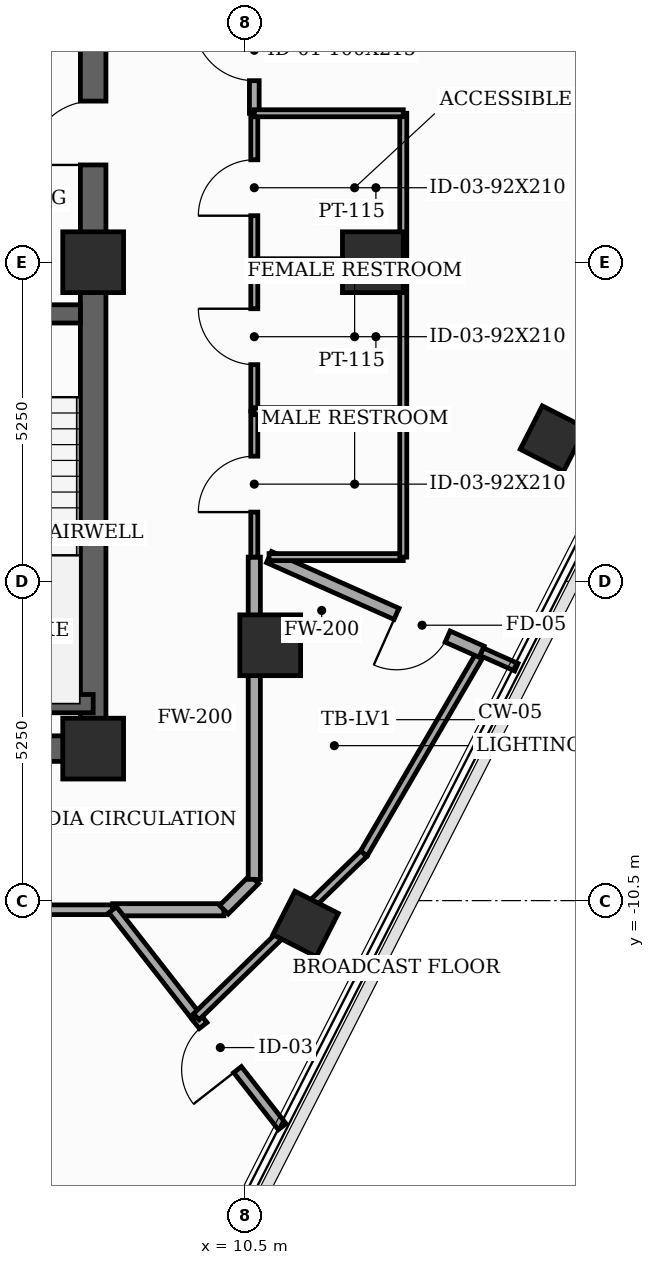
"""IFC4 building model, lengths in metres.
Left out: names, types, materials, properties, quantities, classifications, styles, units other than length and angle.
Written with IfcOpenShell. Run it as: python <this file> out.ifc"""

import sys

from ifc_helpers import new_model, si_unit, direction, frame, frame_2d, origin, origin_2d, place, context, subcontext, project, spatial, rectangle, extrude, element, fill, save


model = new_model("IFC4")
c1 = context("Model", 3, precision=1e-05, world=origin(), true_north=direction((0.0, 1.0)))
c2 = subcontext(c1, "Body", "Model", "MODEL_VIEW")
j1 = project(units=[si_unit("LENGTHUNIT", "METRE"), si_unit("PLANEANGLEUNIT", "RADIAN")], contexts=[c1])
p1 = place(None, origin())
s1 = spatial("IfcSite", under=j1, at=p1, CompositionType="ELEMENT")
p2 = place(p1, origin())
s2 = spatial("IfcBuilding", under=s1, at=p2, CompositionType="ELEMENT")
p3 = place(p2, frame((0.0, 0.0, 274.4)))
s3 = spatial("IfcBuildingStorey", under=s2, at=p3, CompositionType="ELEMENT", Elevation=274.4)
for number, where, z_axis, x_axis in (
    (1, (8.0, -8.0, 0.0), (0.0, 0.0, 1.0), (1.0, 0.0, 0.0)),
    (2, (8.0, 0.0, 0.0), (0.0, 0.0, 1.0), (1.0, 0.0, 0.0)),
    (3, (12.6, 0.0, 0.0), (0.0, 0.0, 1.0), (1.0, 0.0, 0.0)),
    (4, (10.912, -6.3, 0.0), (0.0, 0.0, 1.0), (1.0, 0.0, 0.0)),
):
    element("IfcColumn", number, at=place(p3, frame(where, z_axis=z_axis, x_axis=x_axis)), inside=s3, PredefinedType="COLUMN", context=c2, shape_type="SweptSolid", body=[
        extrude(rectangle(XDim=1.0, YDim=1.0, at=origin_2d()), origin(), (0.0, 0.0, 1.0), 3.7),
    ])
for number, where, z_axis, x_axis in (
    (5, (11.494, -10.885, 0.0), (0.0, 0.0, 1.0), (0.454, 0.891, 0.0)),
    (6, (15.562, -2.901, 0.0), (0.0, 0.0, 1.0), (0.454, 0.891, 0.0)),
):
    element("IfcColumn", number, at=place(p3, frame(where, z_axis=z_axis, x_axis=x_axis)), inside=s3, PredefinedType="COLUMN", context=c2, shape_type="SweptSolid", body=[
        extrude(rectangle(XDim=0.8, YDim=0.8, at=origin_2d()), origin(), (0.0, 0.0, 1.0), 3.7),
    ])
p4 = place(p3, frame((8.0, -8.0, 0.0), z_axis=(0.0, 0.0, 1.0), x_axis=(0.0, 1.0, 0.0)))
e7 = element("IfcWall", 7, at=p4, inside=s3, PredefinedType="SHEAR", context=c2, shape_type="SweptSolid", body=[
    extrude(rectangle(XDim=16.0, YDim=0.42, at=frame_2d((8.0, 0.0))), origin(), (0.0, 0.0, 1.0), 3.46),
])
p5 = place(p4, frame((9.6, 0.0, 0.0)))
e8 = element("IfcOpeningElement", 8, at=p5, cuts=e7, PredefinedType="OPENING", context=c2, shape_type="SweptSolid", body=[
    extrude(rectangle(XDim=1.05, YDim=2.15, at=frame_2d((0.525, 1.075))), frame((0.0, 0.22, 0.0), z_axis=(0.0, -1.0, 0.0), x_axis=(1.0, 0.0, 0.0)), (0.0, 0.0, 1.0), 0.44),
])
p6 = place(p4, frame((14.469, 0.0, 0.0)))
e9 = element("IfcOpeningElement", 9, at=p6, cuts=e7, PredefinedType="OPENING", context=c2, shape_type="SweptSolid", body=[
    extrude(rectangle(XDim=0.85, YDim=2.02, at=frame_2d((0.425, 1.01))), frame((0.0, 0.22, 0.0), z_axis=(0.0, -1.0, 0.0), x_axis=(1.0, 0.0, 0.0)), (0.0, 0.0, 1.0), 0.44),
])
p7 = place(p3, frame((-8.0, -8.0, 0.0), z_axis=(0.0, 0.0, 1.0), x_axis=(1.0, 0.0, 0.0)))
e10 = element("IfcWall", 10, at=p7, inside=s3, PredefinedType="SHEAR", context=c2, shape_type="SweptSolid", body=[
    extrude(rectangle(XDim=16.0, YDim=0.42, at=frame_2d((8.0, 0.0))), origin(), (0.0, 0.0, 1.0), 3.46),
])
p8 = place(p7, frame((4.35, 0.0, 0.0)))
e11 = element("IfcOpeningElement", 11, at=p8, cuts=e10, PredefinedType="OPENING", context=c2, shape_type="SweptSolid", body=[
    extrude(rectangle(XDim=0.85, YDim=2.02, at=frame_2d((0.425, 1.01))), frame((0.0, 0.22, 0.0), z_axis=(0.0, -1.0, 0.0), x_axis=(1.0, 0.0, 0.0)), (0.0, 0.0, 1.0), 0.44),
])
p9 = place(p7, frame((6.49, 0.0, 0.0)))
e12 = element("IfcOpeningElement", 12, at=p9, cuts=e10, PredefinedType="OPENING", context=c2, shape_type="SweptSolid", body=[
    extrude(rectangle(XDim=0.85, YDim=2.02, at=frame_2d((0.425, 1.01))), frame((0.0, 0.22, 0.0), z_axis=(0.0, -1.0, 0.0), x_axis=(1.0, 0.0, 0.0)), (0.0, 0.0, 1.0), 0.44),
])
p10 = place(p7, frame((8.69, 0.0, 0.0)))
e13 = element("IfcOpeningElement", 13, at=p10, cuts=e10, PredefinedType="OPENING", context=c2, shape_type="SweptSolid", body=[
    extrude(rectangle(XDim=0.85, YDim=2.02, at=frame_2d((0.425, 1.01))), frame((0.0, 0.22, 0.0), z_axis=(0.0, -1.0, 0.0), x_axis=(1.0, 0.0, 0.0)), (0.0, 0.0, 1.0), 0.44),
])
p11 = place(p7, frame((10.8, 0.0, 0.0)))
e14 = element("IfcOpeningElement", 14, at=p11, cuts=e10, PredefinedType="OPENING", context=c2, shape_type="SweptSolid", body=[
    extrude(rectangle(XDim=0.85, YDim=2.02, at=frame_2d((0.425, 1.01))), frame((0.0, 0.22, 0.0), z_axis=(0.0, -1.0, 0.0), x_axis=(1.0, 0.0, 0.0)), (0.0, 0.0, 1.0), 0.44),
])
p12 = place(p3, frame((4.45, -0.85, 0.0), z_axis=(0.0, 0.0, 1.0), x_axis=(1.0, 0.0, 0.0)))
e15 = element("IfcWall", 15, at=p12, inside=s3, PredefinedType="SHEAR", context=c2, shape_type="SweptSolid", body=[
    extrude(rectangle(XDim=3.34, YDim=0.3, at=frame_2d((1.67, 0.0))), origin(), (0.0, 0.0, 1.0), 3.46),
])
p13 = place(p12, frame((0.65, 0.0, 0.0)))
e16 = element("IfcOpeningElement", 16, at=p13, cuts=e15, PredefinedType="OPENING", context=c2, shape_type="SweptSolid", body=[
    extrude(rectangle(XDim=1.05, YDim=2.15, at=frame_2d((0.525, 1.075))), frame((0.0, 0.16, 0.0), z_axis=(0.0, -1.0, 0.0), x_axis=(1.0, 0.0, 0.0)), (0.0, 0.0, 1.0), 0.32),
])
p14 = place(p3, frame((4.45, -7.26, 0.0), z_axis=(0.0, 0.0, 1.0), x_axis=(1.0, 0.0, 0.0)))
e17 = element("IfcWall", 17, at=p14, inside=s3, PredefinedType="SHEAR", context=c2, shape_type="SweptSolid", body=[
    extrude(rectangle(XDim=3.55, YDim=0.3, at=frame_2d((1.775, 0.0))), origin(), (0.0, 0.0, 1.0), 3.46),
])
p15 = place(p3, frame((1.878, -10.65, 0.0), z_axis=(0.0, 0.0, 1.0), x_axis=(1.0, 0.0, 0.0)))
e18 = element("IfcWall", 18, at=p15, inside=s3, PredefinedType="PARTITIONING", context=c2, shape_type="SweptSolid", body=[
    extrude(rectangle(XDim=6.443, YDim=0.16, at=frame_2d((3.222, 0.0))), origin(), (0.0, 0.0, 1.0), 2.845),
])
p16 = place(p15, frame((1.304, 0.0, 0.0)))
e19 = element("IfcOpeningElement", 19, at=p16, cuts=e18, PredefinedType="OPENING", context=c2, shape_type="SweptSolid", body=[
    extrude(rectangle(XDim=1.0, YDim=2.15, at=frame_2d((0.5, 1.075))), frame((0.0, 0.09, 0.0), z_axis=(0.0, -1.0, 0.0), x_axis=(1.0, 0.0, 0.0)), (0.0, 0.0, 1.0), 0.18),
])
p17 = place(p3, frame((8.321, -10.65, 0.0), z_axis=(0.0, 0.0, 1.0), x_axis=(1.0, 0.0, 0.0)))
e20 = element("IfcWall", 20, at=p17, inside=s3, PredefinedType="SOLIDWALL", context=c2, shape_type="SweptSolid", body=[
    extrude(rectangle(XDim=1.829, YDim=0.2, at=frame_2d((0.915, 0.0))), origin(), (0.0, 0.0, 1.0), 3.46),
])
p18 = place(p3, frame((10.15, -10.65, 0.0), z_axis=(0.0, 0.0, 1.0), x_axis=(0.707106781187, 0.707106781187, 0.0)))
e21 = element("IfcWall", 21, at=p18, inside=s3, PredefinedType="SOLIDWALL", context=c2, shape_type="SweptSolid", body=[
    extrude(rectangle(XDim=0.707, YDim=0.2, at=frame_2d((0.354, 0.0))), origin(), (0.0, 0.0, 1.0), 3.46),
])
p19 = place(p3, frame((10.65, -10.15, 0.0), z_axis=(0.0, 0.0, 1.0), x_axis=(0.0, 1.0, 0.0)))
e22 = element("IfcWall", 22, at=p19, inside=s3, PredefinedType="SOLIDWALL", context=c2, shape_type="SweptSolid", body=[
    extrude(rectangle(XDim=5.3, YDim=0.2, at=frame_2d((2.65, 0.0))), origin(), (0.0, 0.0, 1.0), 2.045),
])
p20 = place(p3, frame((10.65, -4.85, 0.0), z_axis=(0.0, 0.0, 1.0), x_axis=(0.0, 1.0, 0.0)))
e23 = element("IfcWall", 23, at=p20, inside=s3, PredefinedType="PARTITIONING", context=c2, shape_type="SweptSolid", body=[
    extrude(rectangle(XDim=2.4, YDim=0.115, at=frame_2d((1.2, 0.0))), origin(), (0.0, 0.0, 1.0), 3.46),
])
p21 = place(p20, frame((0.74, 0.0, 0.0)))
e24 = element("IfcOpeningElement", 24, at=p21, cuts=e23, PredefinedType="OPENING", context=c2, shape_type="SweptSolid", body=[
    extrude(rectangle(XDim=0.92, YDim=2.1, at=frame_2d((0.46, 1.05))), frame((0.0, 0.067, 0.0), z_axis=(0.0, -1.0, 0.0), x_axis=(1.0, 0.0, 0.0)), (0.0, 0.0, 1.0), 0.135),
])
p22 = place(p3, frame((10.65, -2.45, 0.0), z_axis=(0.0, 0.0, 1.0), x_axis=(0.0, 1.0, 0.0)))
e25 = element("IfcWall", 25, at=p22, inside=s3, PredefinedType="PARTITIONING", context=c2, shape_type="SweptSolid", body=[
    extrude(rectangle(XDim=2.45, YDim=0.115, at=frame_2d((1.225, 0.0))), origin(), (0.0, 0.0, 1.0), 2.845),
])
p23 = place(p22, frame((0.765, 0.0, 0.0)))
e26 = element("IfcOpeningElement", 26, at=p23, cuts=e25, PredefinedType="OPENING", context=c2, shape_type="SweptSolid", body=[
    extrude(rectangle(XDim=0.92, YDim=2.1, at=frame_2d((0.46, 1.05))), frame((0.0, 0.067, 0.0), z_axis=(0.0, -1.0, 0.0), x_axis=(1.0, 0.0, 0.0)), (0.0, 0.0, 1.0), 0.135),
])
p24 = place(p3, frame((10.65, 0.0, 0.0), z_axis=(0.0, 0.0, 1.0), x_axis=(0.0, 1.0, 0.0)))
e27 = element("IfcWall", 27, at=p24, inside=s3, PredefinedType="PARTITIONING", context=c2, shape_type="SweptSolid", body=[
    extrude(rectangle(XDim=2.45, YDim=0.115, at=frame_2d((1.225, 0.0))), origin(), (0.0, 0.0, 1.0), 2.845),
])
p25 = place(p24, frame((0.765, 0.0, 0.0)))
e28 = element("IfcOpeningElement", 28, at=p25, cuts=e27, PredefinedType="OPENING", context=c2, shape_type="SweptSolid", body=[
    extrude(rectangle(XDim=0.92, YDim=2.1, at=frame_2d((0.46, 1.05))), frame((0.0, 0.067, 0.0), z_axis=(0.0, -1.0, 0.0), x_axis=(1.0, 0.0, 0.0)), (0.0, 0.0, 1.0), 0.135),
])
p26 = place(p3, frame((10.65, 2.45, 0.0), z_axis=(0.0, 0.0, 1.0), x_axis=(0.0, 1.0, 0.0)))
e29 = element("IfcWall", 29, at=p26, inside=s3, PredefinedType="PARTITIONING", context=c2, shape_type="SweptSolid", body=[
    extrude(rectangle(XDim=3.699, YDim=0.16, at=frame_2d((1.85, 0.0))), origin(), (0.0, 0.0, 1.0), 3.46),
])
p27 = place(p26, frame((0.536, 0.0, 0.0)))
e30 = element("IfcOpeningElement", 30, at=p27, cuts=e29, PredefinedType="OPENING", context=c2, shape_type="SweptSolid", body=[
    extrude(rectangle(XDim=1.0, YDim=2.15, at=frame_2d((0.5, 1.075))), frame((0.0, 0.09, 0.0), z_axis=(0.0, -1.0, 0.0), x_axis=(1.0, 0.0, 0.0)), (0.0, 0.0, 1.0), 0.18),
])
p28 = place(p3, frame((11.108, -14.218, 0.0), z_axis=(0.0, 0.0, 1.0), x_axis=(-0.615736984334, 0.787951753677, 0.0)))
e31 = element("IfcWall", 31, at=p28, inside=s3, PredefinedType="PARTITIONING", context=c2, shape_type="SweptSolid", body=[
    extrude(rectangle(XDim=2.294, YDim=0.16, at=frame_2d((1.147, 0.0))), origin(), (0.0, 0.0, 1.0), 2.045),
])
p29 = place(p28, frame((1.191, 0.0, 0.0)))
e32 = element("IfcOpeningElement", 32, at=p29, cuts=e31, PredefinedType="OPENING", context=c2, shape_type="SweptSolid", body=[
    extrude(rectangle(XDim=0.92, YDim=2.0, at=frame_2d((0.46, 1.0))), frame((0.0, 0.09, 0.0), z_axis=(0.0, -1.0, 0.0), x_axis=(1.0, 0.0, 0.0)), (0.0, 0.0, 1.0), 0.18),
])
p30 = place(p3, frame((9.696, -12.411, 0.0), z_axis=(0.0, 0.0, 1.0), x_axis=(-0.615429845305, 0.788191668002, 0.0)))
e33 = element("IfcWall", 33, at=p30, inside=s3, PredefinedType="PARTITIONING", context=c2, shape_type="SweptSolid", body=[
    extrude(rectangle(XDim=2.234, YDim=0.16, at=frame_2d((1.117, 0.0))), origin(), (0.0, 0.0, 1.0), 3.46),
])
p31 = place(p3, frame((14.388, -6.406, 0.0), z_axis=(0.0, 0.0, 1.0), x_axis=(-0.50381969712, -0.863808840424, 0.0)))
e34 = element("IfcWall", 34, at=p31, inside=s3, PredefinedType="PARTITIONING", context=c2, shape_type="SweptSolid", body=[
    extrude(rectangle(XDim=3.845, YDim=0.135, at=frame_2d((1.922, 0.0))), origin(), (0.0, 0.0, 1.0), 2.045),
])
p32 = place(p3, frame((12.451, -9.727, 0.0), z_axis=(0.0, 0.0, 1.0), x_axis=(-0.716282466339, -0.697810453072, 0.0)))
e35 = element("IfcWall", 35, at=p32, inside=s3, PredefinedType="PARTITIONING", context=c2, shape_type="SweptSolid", body=[
    extrude(rectangle(XDim=3.846, YDim=0.135, at=frame_2d((1.923, 0.0))), origin(), (0.0, 0.0, 1.0), 2.045),
])
p33 = place(p3, frame((14.959, -6.66, 0.0), z_axis=(0.0, 0.0, 1.0), x_axis=(-0.91373105304, 0.40631953277, 0.0)))
e36 = element("IfcWall", 36, at=p33, inside=s3, PredefinedType="PARTITIONING", context=c2, shape_type="SweptSolid", body=[
    extrude(rectangle(XDim=0.625, YDim=0.135, at=frame_2d((0.313, 0.0))), origin(), (0.0, 0.0, 1.0), 3.46),
])
p34 = place(p3, frame((14.388, -6.406, 0.0), z_axis=(0.0, 0.0, 1.0), x_axis=(-0.913556095718, 0.406712748726, 0.0)))
e37 = element("IfcWall", 37, at=p34, inside=s3, PredefinedType="SOLIDWALL", context=c2, shape_type="SweptSolid", body=[
    extrude(rectangle(XDim=3.826, YDim=0.2, at=frame_2d((1.913, 0.0))), origin(), (0.0, 0.0, 1.0), 2.045),
])
p35 = place(p34, frame((0.611, 0.0, 0.0)))
e38 = element("IfcOpeningElement", 38, at=p35, cuts=e37, PredefinedType="OPENING", context=c2, shape_type="SweptSolid", body=[
    extrude(rectangle(XDim=0.92, YDim=2.0, at=frame_2d((0.46, 1.0))), frame((0.0, 0.11, 0.0), z_axis=(0.0, -1.0, 0.0), x_axis=(1.0, 0.0, 0.0)), (0.0, 0.0, 1.0), 0.22),
])
p36 = place(p3, frame((13.1, -2.45, 0.0), z_axis=(0.0, 0.0, 1.0), x_axis=(-1.0, 0.0, 0.0)))
e39 = element("IfcWall", 39, at=p36, inside=s3, PredefinedType="PARTITIONING", context=c2, shape_type="SweptSolid", body=[
    extrude(rectangle(XDim=2.45, YDim=0.115, at=frame_2d((1.225, 0.0))), origin(), (0.0, 0.0, 1.0), 2.845),
])
p37 = place(p3, frame((10.893, -4.85, 0.0), z_axis=(0.0, 0.0, 1.0), x_axis=(1.0, 0.0, 0.0)))
e40 = element("IfcWall", 40, at=p37, inside=s3, PredefinedType="PARTITIONING", context=c2, shape_type="SweptSolid", body=[
    extrude(rectangle(XDim=2.207, YDim=0.115, at=frame_2d((1.104, 0.0))), origin(), (0.0, 0.0, 1.0), 2.845),
])
p38 = place(p3, frame((13.1, -4.85, 0.0), z_axis=(0.0, 0.0, 1.0), x_axis=(0.0, 1.0, 0.0)))
e41 = element("IfcWall", 41, at=p38, inside=s3, PredefinedType="PARTITIONING", context=c2, shape_type="SweptSolid", body=[
    extrude(rectangle(XDim=2.4, YDim=0.115, at=frame_2d((1.2, 0.0))), origin(), (0.0, 0.0, 1.0), 3.46),
])
p39 = place(p3, frame((13.1, 0.0, 0.0), z_axis=(0.0, 0.0, 1.0), x_axis=(-1.0, 0.0, 0.0)))
e42 = element("IfcWall", 42, at=p39, inside=s3, PredefinedType="PARTITIONING", context=c2, shape_type="SweptSolid", body=[
    extrude(rectangle(XDim=2.45, YDim=0.115, at=frame_2d((1.225, 0.0))), origin(), (0.0, 0.0, 1.0), 2.045),
])
for number, where, z_axis, x_axis in (
    (43, (13.1, -2.45, 0.0), (0.0, 0.0, 1.0), (0.0, 1.0, 0.0)),
    (44, (13.1, 0.0, 0.0), (0.0, 0.0, 1.0), (0.0, 1.0, 0.0)),
):
    element("IfcWall", number, at=place(p3, frame(where, z_axis=z_axis, x_axis=x_axis)), inside=s3, PredefinedType="PARTITIONING", context=c2, shape_type="SweptSolid", body=[
        extrude(rectangle(XDim=2.45, YDim=0.115, at=frame_2d((1.225, 0.0))), origin(), (0.0, 0.0, 1.0), 2.045),
    ])
p40 = place(p3, frame((13.1, 2.45, 0.0), z_axis=(0.0, 0.0, 1.0), x_axis=(-1.0, 0.0, 0.0)))
e45 = element("IfcWall", 45, at=p40, inside=s3, PredefinedType="PARTITIONING", context=c2, shape_type="SweptSolid", body=[
    extrude(rectangle(XDim=2.45, YDim=0.115, at=frame_2d((1.225, 0.0))), origin(), (0.0, 0.0, 1.0), 2.845),
])
p41 = place(p5, origin())
e46 = element("IfcDoor", 46, at=p41, inside=s3, OperationType="SINGLE_SWING_LEFT", PredefinedType="DOOR", context=c2, shape_type="SweptSolid", body=[
    extrude(rectangle(XDim=1.05, YDim=2.15, at=frame_2d((0.525, 1.075))), frame((0.0, 0.025, 0.0), z_axis=(0.0, -1.0, 0.0), x_axis=(1.0, 0.0, 0.0)), (0.0, 0.0, 1.0), 0.05),
])
fill(e8, e46)
p42 = place(p21, origin())
e47 = element("IfcDoor", 47, at=p42, inside=s3, OperationType="SINGLE_SWING_LEFT", PredefinedType="DOOR", context=c2, shape_type="SweptSolid", body=[
    extrude(rectangle(XDim=0.92, YDim=2.1, at=frame_2d((0.46, 1.05))), frame((0.0, 0.025, 0.0), z_axis=(0.0, -1.0, 0.0), x_axis=(1.0, 0.0, 0.0)), (0.0, 0.0, 1.0), 0.05),
])
fill(e24, e47)
p43 = place(p23, origin())
e48 = element("IfcDoor", 48, at=p43, inside=s3, OperationType="SINGLE_SWING_RIGHT", PredefinedType="DOOR", context=c2, shape_type="SweptSolid", body=[
    extrude(rectangle(XDim=0.92, YDim=2.1, at=frame_2d((0.46, 1.05))), frame((0.0, 0.025, 0.0), z_axis=(0.0, -1.0, 0.0), x_axis=(1.0, 0.0, 0.0)), (0.0, 0.0, 1.0), 0.05),
])
fill(e26, e48)
p44 = place(p25, origin())
e49 = element("IfcDoor", 49, at=p44, inside=s3, OperationType="SINGLE_SWING_LEFT", PredefinedType="DOOR", context=c2, shape_type="SweptSolid", body=[
    extrude(rectangle(XDim=0.92, YDim=2.1, at=frame_2d((0.46, 1.05))), frame((0.0, 0.025, 0.0), z_axis=(0.0, -1.0, 0.0), x_axis=(1.0, 0.0, 0.0)), (0.0, 0.0, 1.0), 0.05),
])
fill(e28, e49)
p45 = place(p27, origin())
e50 = element("IfcDoor", 50, at=p45, inside=s3, OperationType="SINGLE_SWING_RIGHT", PredefinedType="DOOR", context=c2, shape_type="SweptSolid", body=[
    extrude(rectangle(XDim=1.0, YDim=2.15, at=frame_2d((0.5, 1.075))), frame((0.0, 0.025, 0.0), z_axis=(0.0, -1.0, 0.0), x_axis=(1.0, 0.0, 0.0)), (0.0, 0.0, 1.0), 0.05),
])
fill(e30, e50)
p46 = place(p29, origin())
e51 = element("IfcDoor", 51, at=p46, inside=s3, OperationType="SINGLE_SWING_LEFT", PredefinedType="DOOR", context=c2, shape_type="SweptSolid", body=[
    extrude(rectangle(XDim=0.92, YDim=2.0, at=frame_2d((0.46, 1.0))), frame((0.0, 0.025, 0.0), z_axis=(0.0, -1.0, 0.0), x_axis=(1.0, 0.0, 0.0)), (0.0, 0.0, 1.0), 0.05),
])
fill(e32, e51)
p47 = place(p35, origin())
e52 = element("IfcDoor", 52, at=p47, inside=s3, OperationType="SINGLE_SWING_RIGHT", PredefinedType="DOOR", context=c2, shape_type="SweptSolid", body=[
    extrude(rectangle(XDim=0.92, YDim=2.0, at=frame_2d((0.46, 1.0))), frame((0.0, 0.025, 0.0), z_axis=(0.0, -1.0, 0.0), x_axis=(1.0, 0.0, 0.0)), (0.0, 0.0, 1.0), 0.05),
])
fill(e38, e52)
save(model, sys.argv[1])
